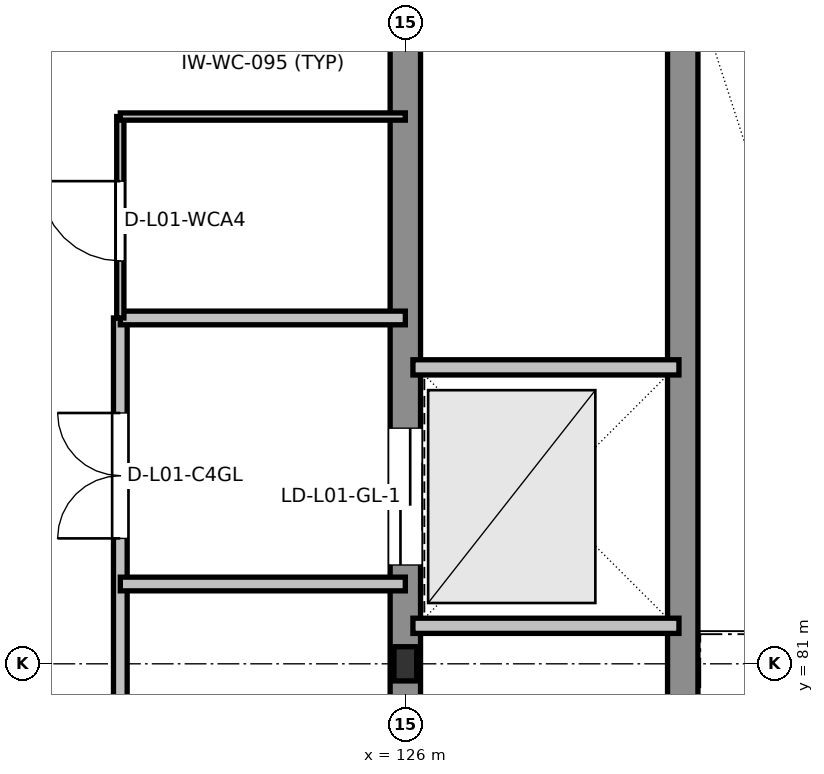
"""IFC4 building model, lengths in metres.
Left out: names, types, materials, properties, quantities, classifications, styles, units other than length and angle.
Written with IfcOpenShell. Run it as: python <this file> out.ifc"""

import sys

from ifc_helpers import new_model, si_unit, direction, frame, frame_2d, origin, origin_2d, place, context, subcontext, project, spatial, rectangle, i_section, extrude, element, fill, save


model = new_model("IFC4")
c1 = context("Model", 3, precision=1e-05, world=origin(), true_north=direction((0.0, 1.0)))
c2 = subcontext(c1, "Body", "Model", "MODEL_VIEW")
j1 = project(units=[si_unit("LENGTHUNIT", "METRE"), si_unit("PLANEANGLEUNIT", "RADIAN")], contexts=[c1])
p1 = place(None, origin())
s1 = spatial("IfcSite", under=j1, at=p1, CompositionType="ELEMENT")
p2 = place(p1, origin())
s2 = spatial("IfcBuilding", under=s1, at=p2, CompositionType="ELEMENT")
p3 = place(p2, frame((0.0, 0.0, 5.4)))
s3 = spatial("IfcBuildingStorey", under=s2, at=p3, CompositionType="ELEMENT", Elevation=5.4)
p4 = place(p3, frame((126.0, 81.0, 0.0), z_axis=(0.0, 0.0, 1.0), x_axis=(1.0, 0.0, 0.0)))
e1 = element("IfcColumn", 1, at=p4, inside=s3, PredefinedType="COLUMN", context=c2, shape_type="SweptSolid", body=[
    extrude(i_section(OverallWidth=0.3, OverallDepth=0.45, WebThickness=0.014, FlangeThickness=0.026, at=origin_2d()), origin(), (0.0, 0.0, 1.0), 4.8),
])
p5 = place(p3, frame((126.0, 90.0, 0.0), z_axis=(0.0, 0.0, 1.0), x_axis=(0.0, -1.0, 0.0)))
e2 = element("IfcWall", 2, at=p5, inside=s3, PredefinedType="SHEAR", context=c2, shape_type="SweptSolid", body=[
    extrude(rectangle(XDim=18.0, YDim=0.4, at=frame_2d((9.0, 0.0))), origin(), (0.0, 0.0, 1.0), 4.56),
])
p6 = place(p5, frame((16.1, 0.0, 0.0)))
e3 = element("IfcOpeningElement", 3, at=p6, cuts=e2, PredefinedType="OPENING", context=c2, shape_type="SweptSolid", body=[
    extrude(rectangle(XDim=1.1, YDim=2.16, at=frame_2d((0.55, 1.08))), frame((0.0, 0.21, 0.0), z_axis=(0.0, -1.0, 0.0), x_axis=(1.0, 0.0, 0.0)), (0.0, 0.0, 1.0), 0.42),
])
p7 = place(p5, frame((13.45, 0.0, 0.0)))
e4 = element("IfcOpeningElement", 4, at=p7, cuts=e2, PredefinedType="OPENING", context=c2, shape_type="SweptSolid", body=[
    extrude(rectangle(XDim=1.2, YDim=2.2, at=frame_2d((0.6, 1.1))), frame((0.0, 0.21, 0.0), z_axis=(0.0, -1.0, 0.0), x_axis=(1.0, 0.0, 0.0)), (0.0, 0.0, 1.0), 0.42),
])
p8 = place(p5, frame((10.65, 0.0, 0.0)))
e5 = element("IfcOpeningElement", 5, at=p8, cuts=e2, PredefinedType="OPENING", context=c2, shape_type="SweptSolid", body=[
    extrude(rectangle(XDim=1.2, YDim=2.2, at=frame_2d((0.6, 1.1))), frame((0.0, 0.21, 0.0), z_axis=(0.0, -1.0, 0.0), x_axis=(1.0, 0.0, 0.0)), (0.0, 0.0, 1.0), 0.42),
])
p9 = place(p5, frame((5.9, 0.0, 0.0)))
e6 = element("IfcOpeningElement", 6, at=p9, cuts=e2, PredefinedType="OPENING", context=c2, shape_type="SweptSolid", body=[
    extrude(rectangle(XDim=1.8, YDim=2.35, at=frame_2d((0.9, 1.175))), frame((0.0, 0.21, 0.0), z_axis=(0.0, -1.0, 0.0), x_axis=(1.0, 0.0, 0.0)), (0.0, 0.0, 1.0), 0.42),
])
p10 = place(p3, frame((129.65, 72.0, 0.0), z_axis=(0.0, 0.0, 1.0), x_axis=(0.0, 1.0, 0.0)))
e7 = element("IfcWall", 7, at=p10, inside=s3, PredefinedType="SHEAR", context=c2, shape_type="SweptSolid", body=[
    extrude(rectangle(XDim=18.0, YDim=0.4, at=frame_2d((9.0, 0.0))), origin(), (0.0, 0.0, 1.0), 4.56),
])
p11 = place(p10, frame((0.7, 0.0, 0.0)))
e8 = element("IfcOpeningElement", 8, at=p11, cuts=e7, PredefinedType="OPENING", context=c2, shape_type="SweptSolid", body=[
    extrude(rectangle(XDim=1.1, YDim=2.16, at=frame_2d((0.55, 1.08))), frame((0.0, 0.21, 0.0), z_axis=(0.0, -1.0, 0.0), x_axis=(1.0, 0.0, 0.0)), (0.0, 0.0, 1.0), 0.42),
])
for number, where, z_axis, x_axis in (
    (9, (126.1, 81.5, 0.0), (0.0, 0.0, 1.0), (1.0, 0.0, 0.0)),
    (10, (126.1, 84.9, 0.0), (0.0, 0.0, 1.0), (1.0, 0.0, 0.0)),
):
    element("IfcWall", number, at=place(p3, frame(where, z_axis=z_axis, x_axis=x_axis)), inside=s3, PredefinedType="PARTITIONING", context=c2, shape_type="SweptSolid", body=[
        extrude(rectangle(XDim=3.5, YDim=0.2, at=frame_2d((1.75, 0.0))), origin(), (0.0, 0.0, 1.0), 4.56),
    ])
p12 = place(p3, frame((122.25, 72.0, 0.0), z_axis=(0.0, 0.0, 1.0), x_axis=(0.0, 1.0, 0.0)))
e11 = element("IfcWall", 11, at=p12, inside=s3, PredefinedType="PARTITIONING", context=c2, shape_type="SweptSolid", body=[
    extrude(rectangle(XDim=13.55, YDim=0.18, at=frame_2d((6.775, 0.0))), origin(), (0.0, 0.0, 1.0), 4.56),
])
p13 = place(p12, frame((0.75, 0.0, 0.0)))
e12 = element("IfcOpeningElement", 12, at=p13, cuts=e11, PredefinedType="OPENING", context=c2, shape_type="SweptSolid", body=[
    extrude(rectangle(XDim=1.1, YDim=2.16, at=frame_2d((0.55, 1.08))), frame((0.0, 0.1, 0.0), z_axis=(0.0, -1.0, 0.0), x_axis=(1.0, 0.0, 0.0)), (0.0, 0.0, 1.0), 0.2),
])
p14 = place(p12, frame((3.2, 0.0, 0.0)))
e13 = element("IfcOpeningElement", 13, at=p14, cuts=e11, PredefinedType="OPENING", context=c2, shape_type="SweptSolid", body=[
    extrude(rectangle(XDim=1.4, YDim=2.2, at=frame_2d((0.7, 1.1))), frame((0.0, 0.1, 0.0), z_axis=(0.0, -1.0, 0.0), x_axis=(1.0, 0.0, 0.0)), (0.0, 0.0, 1.0), 0.2),
])
p15 = place(p12, frame((6.65, 0.0, 0.0)))
e14 = element("IfcOpeningElement", 14, at=p15, cuts=e11, PredefinedType="OPENING", context=c2, shape_type="SweptSolid", body=[
    extrude(rectangle(XDim=1.4, YDim=2.2, at=frame_2d((0.7, 1.1))), frame((0.0, 0.1, 0.0), z_axis=(0.0, -1.0, 0.0), x_axis=(1.0, 0.0, 0.0)), (0.0, 0.0, 1.0), 0.2),
])
p16 = place(p12, frame((10.65, 0.0, 0.0)))
e15 = element("IfcOpeningElement", 15, at=p16, cuts=e11, PredefinedType="OPENING", context=c2, shape_type="SweptSolid", body=[
    extrude(rectangle(XDim=1.65, YDim=2.25, at=frame_2d((0.825, 1.125))), frame((0.0, 0.1, 0.0), z_axis=(0.0, -1.0, 0.0), x_axis=(1.0, 0.0, 0.0)), (0.0, 0.0, 1.0), 0.2),
])
for number, where, z_axis, x_axis in (
    (16, (122.25, 82.05, 0.0), (0.0, 0.0, 1.0), (1.0, 0.0, 0.0)),
    (17, (122.25, 85.55, 0.0), (0.0, 0.0, 1.0), (1.0, 0.0, 0.0)),
):
    element("IfcWall", number, at=place(p3, frame(where, z_axis=z_axis, x_axis=x_axis)), inside=s3, PredefinedType="PARTITIONING", context=c2, shape_type="SweptSolid", body=[
        extrude(rectangle(XDim=3.75, YDim=0.18, at=frame_2d((1.875, 0.0))), origin(), (0.0, 0.0, 1.0), 4.56),
    ])
p17 = place(p3, frame((122.25, 85.55, 0.0), z_axis=(0.0, 0.0, 1.0), x_axis=(0.0, 1.0, 0.0)))
e18 = element("IfcWall", 18, at=p17, inside=s3, PredefinedType="PARTITIONING", context=c2, shape_type="SweptSolid", body=[
    extrude(rectangle(XDim=2.65, YDim=0.095, at=frame_2d((1.325, 0.0))), origin(), (0.0, 0.0, 1.0), 4.56),
])
p18 = place(p17, frame((0.75, 0.0, 0.0)))
e19 = element("IfcOpeningElement", 19, at=p18, cuts=e18, PredefinedType="OPENING", context=c2, shape_type="SweptSolid", body=[
    extrude(rectangle(XDim=1.05, YDim=2.13, at=frame_2d((0.525, 1.065))), frame((0.0, 0.057, 0.0), z_axis=(0.0, -1.0, 0.0), x_axis=(1.0, 0.0, 0.0)), (0.0, 0.0, 1.0), 0.115),
])
p19 = place(p3, frame((122.25, 88.2, 0.0), z_axis=(0.0, 0.0, 1.0), x_axis=(1.0, 0.0, 0.0)))
e20 = element("IfcWall", 20, at=p19, inside=s3, PredefinedType="PARTITIONING", context=c2, shape_type="SweptSolid", body=[
    extrude(rectangle(XDim=3.75, YDim=0.095, at=frame_2d((1.875, 0.0))), origin(), (0.0, 0.0, 1.0), 4.56),
])
p20 = place(p9, origin())
e21 = element("IfcDoor", 21, at=p20, inside=s3, OperationType="DOUBLE_DOOR_SLIDING", PredefinedType="DOOR", context=c2, shape_type="SweptSolid", body=[
    extrude(rectangle(XDim=1.8, YDim=2.35, at=frame_2d((0.9, 1.175))), frame((0.0, 0.025, 0.0), z_axis=(0.0, -1.0, 0.0), x_axis=(1.0, 0.0, 0.0)), (0.0, 0.0, 1.0), 0.05),
])
fill(e6, e21)
p21 = place(p16, origin())
e22 = element("IfcDoor", 22, at=p21, inside=s3, OperationType="DOUBLE_DOOR_SINGLE_SWING", PredefinedType="DOOR", context=c2, shape_type="SweptSolid", body=[
    extrude(rectangle(XDim=1.65, YDim=2.25, at=frame_2d((0.825, 1.125))), frame((0.0, 0.025, 0.0), z_axis=(0.0, -1.0, 0.0), x_axis=(1.0, 0.0, 0.0)), (0.0, 0.0, 1.0), 0.05),
])
fill(e15, e22)
p22 = place(p18, origin())
e23 = element("IfcDoor", 23, at=p22, inside=s3, OperationType="SINGLE_SWING_RIGHT", PredefinedType="DOOR", context=c2, shape_type="SweptSolid", body=[
    extrude(rectangle(XDim=1.05, YDim=2.13, at=frame_2d((0.525, 1.065))), frame((0.0, 0.025, 0.0), z_axis=(0.0, -1.0, 0.0), x_axis=(1.0, 0.0, 0.0)), (0.0, 0.0, 1.0), 0.05),
])
fill(e19, e23)
save(model, sys.argv[1])
